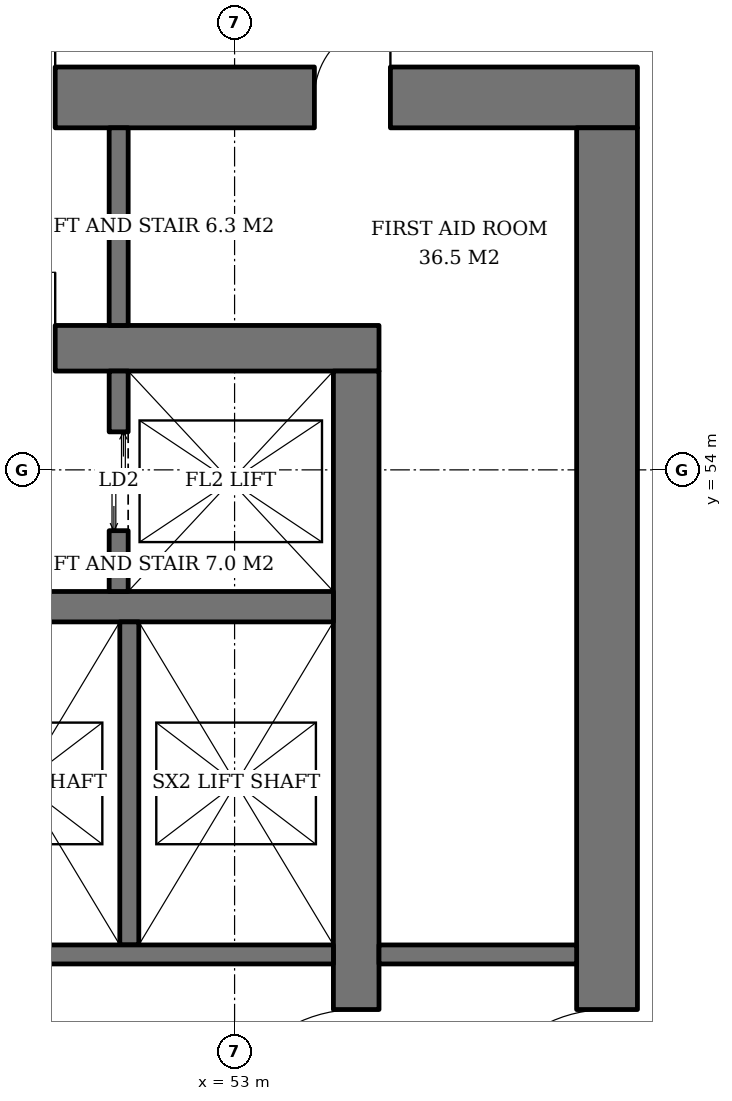
"""IFC4 building model, lengths in metres.
Left out: names, types, materials, properties, quantities, classifications, styles, units other than length and angle.
Written with IfcOpenShell. Run it as: python <this file> out.ifc"""

import sys

from ifc_helpers import new_model, si_unit, direction, frame, frame_2d, origin, place, context, subcontext, project, spatial, rectangle, extrude, element, fill, save


model = new_model("IFC4")
c1 = context("Model", 3, precision=1e-05, world=origin(), true_north=direction((0.0, 1.0)))
c2 = subcontext(c1, "Body", "Model", "MODEL_VIEW")
j1 = project(units=[si_unit("LENGTHUNIT", "METRE"), si_unit("PLANEANGLEUNIT", "RADIAN")], contexts=[c1])
p1 = place(None, origin())
s1 = spatial("IfcSite", under=j1, at=p1, CompositionType="ELEMENT")
p2 = place(p1, origin())
s2 = spatial("IfcBuilding", under=s1, at=p2, CompositionType="ELEMENT")
p3 = place(p2, frame((0.0, 0.0, 62.8)))
s3 = spatial("IfcBuildingStorey", under=s2, at=p3, CompositionType="ELEMENT", Elevation=62.8)
p4 = place(p3, frame((35.1, 55.6, 0.0), z_axis=(0.0, 0.0, 1.0), x_axis=(1.0, 0.0, 0.0)))
e1 = element("IfcWall", 1, at=p4, inside=s3, PredefinedType="SHEAR", context=c2, shape_type="SweptSolid", body=[
    extrude(rectangle(XDim=19.8, YDim=0.6, at=frame_2d((9.9, 0.0))), origin(), (0.0, 0.0, 1.0), 3.8),
])
p5 = place(p4, frame((14.54, 0.0, 0.0)))
e2 = element("IfcOpeningElement", 2, at=p5, cuts=e1, PredefinedType="OPENING", context=c2, shape_type="SweptSolid", body=[
    extrude(rectangle(XDim=1.0, YDim=2.1, at=frame_2d((0.5, 1.05))), frame((0.0, 0.31, 0.0), z_axis=(0.0, -1.0, 0.0), x_axis=(1.0, 0.0, 0.0)), (0.0, 0.0, 1.0), 0.62),
])
p6 = place(p4, frame((2.425, 0.0, 0.0)))
e3 = element("IfcOpeningElement", 3, at=p6, cuts=e1, PredefinedType="OPENING", context=c2, shape_type="SweptSolid", body=[
    extrude(rectangle(XDim=1.0, YDim=2.1, at=frame_2d((0.5, 1.05))), frame((0.0, 0.31, 0.0), z_axis=(0.0, -1.0, 0.0), x_axis=(1.0, 0.0, 0.0)), (0.0, 0.0, 1.0), 0.62),
])
p7 = place(p3, frame((54.6, 36.7, 0.0), z_axis=(0.0, 0.0, 1.0), x_axis=(0.0, 1.0, 0.0)))
e4 = element("IfcWall", 4, at=p7, inside=s3, PredefinedType="SHEAR", context=c2, shape_type="SweptSolid", body=[
    extrude(rectangle(XDim=18.6, YDim=0.6, at=frame_2d((9.3, 0.0))), origin(), (0.0, 0.0, 1.0), 3.8),
])
p8 = place(p7, frame((8.4, 0.0, 0.0)))
e5 = element("IfcOpeningElement", 5, at=p8, cuts=e4, PredefinedType="OPENING", context=c2, shape_type="SweptSolid", body=[
    extrude(rectangle(XDim=1.8, YDim=2.4, at=frame_2d((0.9, 1.2))), frame((0.0, 0.31, 0.0), z_axis=(0.0, -1.0, 0.0), x_axis=(1.0, 0.0, 0.0)), (0.0, 0.0, 1.0), 0.62),
])
p9 = place(p3, frame((31.7, 58.9, 0.0), z_axis=(0.0, 0.0, 1.0), x_axis=(1.0, 0.0, 0.0)))
e6 = element("IfcWall", 6, at=p9, inside=s3, PredefinedType="SHEAR", context=c2, shape_type="SweptSolid", body=[
    extrude(rectangle(XDim=26.6, YDim=0.8, at=frame_2d((13.3, 0.0))), origin(), (0.0, 0.0, 1.0), 3.8),
])
p10 = place(p9, frame((17.94, 0.0, 0.0)))
e7 = element("IfcOpeningElement", 7, at=p10, cuts=e6, PredefinedType="OPENING", context=c2, shape_type="SweptSolid", body=[
    extrude(rectangle(XDim=1.0, YDim=2.1, at=frame_2d((0.5, 1.05))), frame((0.0, 0.41, 0.0), z_axis=(0.0, -1.0, 0.0), x_axis=(1.0, 0.0, 0.0)), (0.0, 0.0, 1.0), 0.82),
])
p11 = place(p9, frame((5.825, 0.0, 0.0)))
e8 = element("IfcOpeningElement", 8, at=p11, cuts=e6, PredefinedType="OPENING", context=c2, shape_type="SweptSolid", body=[
    extrude(rectangle(XDim=1.0, YDim=2.1, at=frame_2d((0.5, 1.05))), frame((0.0, 0.41, 0.0), z_axis=(0.0, -1.0, 0.0), x_axis=(1.0, 0.0, 0.0)), (0.0, 0.0, 1.0), 0.82),
])
p12 = place(p9, frame((2.637, 0.0, 0.0)))
e9 = element("IfcOpeningElement", 9, at=p12, cuts=e6, PredefinedType="OPENING", context=c2, shape_type="SweptSolid", body=[
    extrude(rectangle(XDim=1.0, YDim=2.1, at=frame_2d((0.5, 1.05))), frame((0.0, 0.41, 0.0), z_axis=(0.0, -1.0, 0.0), x_axis=(1.0, 0.0, 0.0)), (0.0, 0.0, 1.0), 0.82),
])
p13 = place(p9, frame((8.44, 0.0, 0.0)))
e10 = element("IfcOpeningElement", 10, at=p13, cuts=e6, PredefinedType="OPENING", context=c2, shape_type="SweptSolid", body=[
    extrude(rectangle(XDim=1.0, YDim=2.1, at=frame_2d((0.5, 1.05))), frame((0.0, 0.41, 0.0), z_axis=(0.0, -1.0, 0.0), x_axis=(1.0, 0.0, 0.0)), (0.0, 0.0, 1.0), 0.82),
])
p14 = place(p9, frame((13.342, 0.0, 0.0)))
e11 = element("IfcOpeningElement", 11, at=p14, cuts=e6, PredefinedType="OPENING", context=c2, shape_type="SweptSolid", body=[
    extrude(rectangle(XDim=1.0, YDim=2.1, at=frame_2d((0.5, 1.05))), frame((0.0, 0.41, 0.0), z_axis=(0.0, -1.0, 0.0), x_axis=(1.0, 0.0, 0.0)), (0.0, 0.0, 1.0), 0.82),
])
p15 = place(p9, frame((22.35, 0.0, 0.0)))
e12 = element("IfcOpeningElement", 12, at=p15, cuts=e6, PredefinedType="OPENING", context=c2, shape_type="SweptSolid", body=[
    extrude(rectangle(XDim=1.0, YDim=2.1, at=frame_2d((0.5, 1.05))), frame((0.0, 0.41, 0.0), z_axis=(0.0, -1.0, 0.0), x_axis=(1.0, 0.0, 0.0)), (0.0, 0.0, 1.0), 0.82),
])
p16 = place(p3, frame((57.9, 33.5, 0.0), z_axis=(0.0, 0.0, 1.0), x_axis=(0.0, 1.0, 0.0)))
e13 = element("IfcWall", 13, at=p16, inside=s3, PredefinedType="SHEAR", context=c2, shape_type="SweptSolid", body=[
    extrude(rectangle(XDim=25.0, YDim=0.8, at=frame_2d((12.5, 0.0))), origin(), (0.0, 0.0, 1.0), 3.8),
])
p17 = place(p16, frame((11.6, 0.0, 0.0)))
e14 = element("IfcOpeningElement", 14, at=p17, cuts=e13, PredefinedType="OPENING", context=c2, shape_type="SweptSolid", body=[
    extrude(rectangle(XDim=1.8, YDim=2.4, at=frame_2d((0.9, 1.2))), frame((0.0, 0.41, 0.0), z_axis=(0.0, -1.0, 0.0), x_axis=(1.0, 0.0, 0.0)), (0.0, 0.0, 1.0), 0.82),
])
p18 = place(p3, frame((35.7, 52.2, 0.0), z_axis=(0.0, 0.0, 1.0), x_axis=(1.0, 0.0, 0.0)))
e15 = element("IfcWall", 15, at=p18, inside=s3, PredefinedType="SHEAR", context=c2, shape_type="SweptSolid", body=[
    extrude(rectangle(XDim=18.6, YDim=0.4, at=frame_2d((9.3, 0.0))), origin(), (0.0, 0.0, 1.0), 3.8),
])
p19 = place(p3, frame((51.475, 52.4, 0.0), z_axis=(0.0, 0.0, 1.0), x_axis=(0.0, 1.0, 0.0)))
e16 = element("IfcWall", 16, at=p19, inside=s3, PredefinedType="SHEAR", context=c2, shape_type="SweptSolid", body=[
    extrude(rectangle(XDim=2.9, YDim=0.25, at=frame_2d((1.45, 0.0))), origin(), (0.0, 0.0, 1.0), 3.8),
])
p20 = place(p19, frame((0.8, 0.0, 0.0)))
e17 = element("IfcOpeningElement", 17, at=p20, cuts=e16, PredefinedType="OPENING", context=c2, shape_type="SweptSolid", body=[
    extrude(rectangle(XDim=1.3, YDim=2.2, at=frame_2d((0.65, 1.1))), frame((0.0, 0.135, 0.0), z_axis=(0.0, -1.0, 0.0), x_axis=(1.0, 0.0, 0.0)), (0.0, 0.0, 1.0), 0.27),
])
p21 = place(p3, frame((51.615, 47.75, 0.0), z_axis=(0.0, 0.0, 1.0), x_axis=(0.0, 1.0, 0.0)))
e18 = element("IfcWall", 18, at=p21, inside=s3, PredefinedType="SHEAR", context=c2, shape_type="SweptSolid", body=[
    extrude(rectangle(XDim=4.25, YDim=0.25, at=frame_2d((2.125, 0.0))), origin(), (0.0, 0.0, 1.0), 3.8),
])
p22 = place(p3, frame((48.93, 47.625, 0.0), z_axis=(0.0, 0.0, 1.0), x_axis=(1.0, 0.0, 0.0)))
e19 = element("IfcWall", 19, at=p22, inside=s3, PredefinedType="SHEAR", context=c2, shape_type="SweptSolid", body=[
    extrude(rectangle(XDim=5.37, YDim=0.25, at=frame_2d((2.685, 0.0))), origin(), (0.0, 0.0, 1.0), 3.8),
])
for number, where, z_axis, x_axis in (
    (20, (51.475, 55.9, 0.0), (0.0, 0.0, 1.0), (0.0, 1.0, 0.0)),
    (21, (54.9, 47.625, 0.0), (0.0, 0.0, 1.0), (1.0, 0.0, 0.0)),
):
    element("IfcWall", number, at=place(p3, frame(where, z_axis=z_axis, x_axis=x_axis)), inside=s3, PredefinedType="SOLIDWALL", context=c2, shape_type="SweptSolid", body=[
        extrude(rectangle(XDim=2.6, YDim=0.25, at=frame_2d((1.3, 0.0))), origin(), (0.0, 0.0, 1.0), 3.62),
    ])
p23 = place(p20, origin())
e22 = element("IfcDoor", 22, at=p23, inside=s3, OperationType="DOUBLE_DOOR_SLIDING", PredefinedType="DOOR", context=c2, shape_type="SweptSolid", body=[
    extrude(rectangle(XDim=1.3, YDim=2.2, at=frame_2d((0.65, 1.1))), frame((0.0, 0.025, 0.0), z_axis=(0.0, -1.0, 0.0), x_axis=(1.0, 0.0, 0.0)), (0.0, 0.0, 1.0), 0.05),
])
fill(e17, e22)
p24 = place(p5, origin())
e23 = element("IfcDoor", 23, at=p24, inside=s3, OperationType="SINGLE_SWING_RIGHT", PredefinedType="DOOR", context=c2, shape_type="SweptSolid", body=[
    extrude(rectangle(XDim=1.0, YDim=2.1, at=frame_2d((0.5, 1.05))), frame((0.0, 0.025, 0.0), z_axis=(0.0, -1.0, 0.0), x_axis=(1.0, 0.0, 0.0)), (0.0, 0.0, 1.0), 0.05),
])
fill(e2, e23)
p25 = place(p8, origin())
e24 = element("IfcDoor", 24, at=p25, inside=s3, OperationType="DOUBLE_DOOR_SINGLE_SWING", PredefinedType="DOOR", context=c2, shape_type="SweptSolid", body=[
    extrude(rectangle(XDim=1.8, YDim=2.4, at=frame_2d((0.9, 1.2))), frame((0.0, 0.025, 0.0), z_axis=(0.0, -1.0, 0.0), x_axis=(1.0, 0.0, 0.0)), (0.0, 0.0, 1.0), 0.05),
])
fill(e5, e24)
p26 = place(p17, origin())
e25 = element("IfcDoor", 25, at=p26, inside=s3, OperationType="DOUBLE_DOOR_SINGLE_SWING", PredefinedType="DOOR", context=c2, shape_type="SweptSolid", body=[
    extrude(rectangle(XDim=1.8, YDim=2.4, at=frame_2d((0.9, 1.2))), frame((0.0, 0.025, 0.0), z_axis=(0.0, -1.0, 0.0), x_axis=(1.0, 0.0, 0.0)), (0.0, 0.0, 1.0), 0.05),
])
fill(e14, e25)
p27 = place(p10, origin())
e26 = element("IfcDoor", 26, at=p27, inside=s3, OperationType="SINGLE_SWING_RIGHT", PredefinedType="DOOR", context=c2, shape_type="SweptSolid", body=[
    extrude(rectangle(XDim=1.0, YDim=2.1, at=frame_2d((0.5, 1.05))), frame((0.0, 0.025, 0.0), z_axis=(0.0, -1.0, 0.0), x_axis=(1.0, 0.0, 0.0)), (0.0, 0.0, 1.0), 0.05),
])
fill(e7, e26)
p28 = place(p15, origin())
e27 = element("IfcDoor", 27, at=p28, inside=s3, OperationType="SINGLE_SWING_RIGHT", PredefinedType="DOOR", context=c2, shape_type="SweptSolid", body=[
    extrude(rectangle(XDim=1.0, YDim=2.1, at=frame_2d((0.5, 1.05))), frame((0.0, -0.34, 0.0), z_axis=(0.0, -1.0, 0.0), x_axis=(1.0, 0.0, 0.0)), (0.0, 0.0, 1.0), 0.05),
])
fill(e12, e27)
save(model, sys.argv[1])
